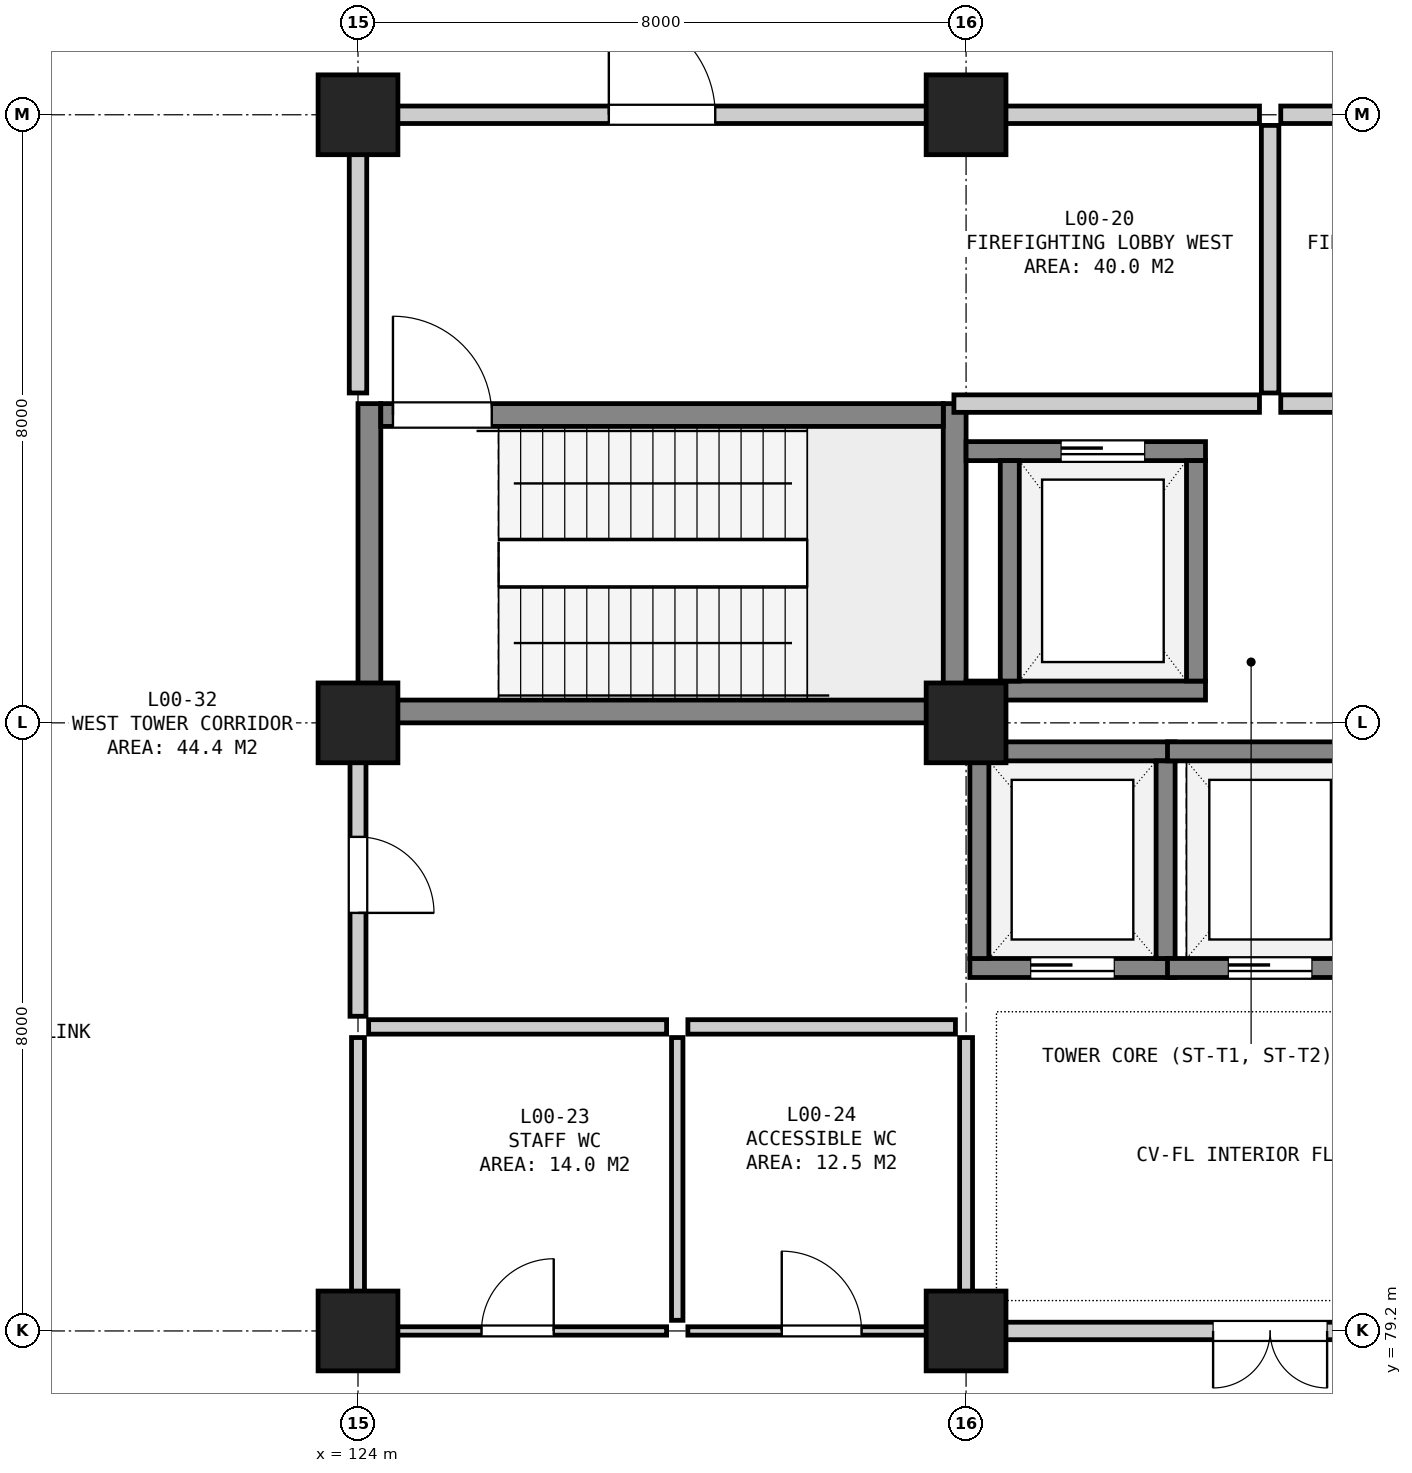
"""IFC4 building model, lengths in metres.
Left out: names, types, materials, properties, quantities, classifications, styles, units other than length and angle.
Written with IfcOpenShell. Run it as: python <this file> out.ifc"""

import sys

from ifc_helpers import new_model, si_unit, direction, frame, frame_2d, origin, origin_2d, place, context, subcontext, project, spatial, rectangle, extrude, element, fill, save


model = new_model("IFC4")
c1 = context("Model", 3, precision=1e-05, world=origin(), true_north=direction((0.0, 1.0)))
c2 = subcontext(c1, "Body", "Model", "MODEL_VIEW")
j1 = project(units=[si_unit("LENGTHUNIT", "METRE"), si_unit("PLANEANGLEUNIT", "RADIAN")], contexts=[c1])
p1 = place(None, origin())
s1 = spatial("IfcSite", under=j1, at=p1, CompositionType="ELEMENT")
p2 = place(p1, origin())
s2 = spatial("IfcBuilding", under=s1, at=p2, CompositionType="ELEMENT")
p3 = place(p2, origin())
s3 = spatial("IfcBuildingStorey", under=s2, at=p3, CompositionType="ELEMENT", Elevation=0.0)
for number, where, z_axis, x_axis in (
    (1, (124.0, 79.2, 0.0), (0.0, 0.0, 1.0), (1.0, 0.0, 0.0)),
    (2, (124.0, 87.2, 0.0), (0.0, 0.0, 1.0), (1.0, 0.0, 0.0)),
    (3, (124.0, 95.2, 0.0), (0.0, 0.0, 1.0), (1.0, 0.0, 0.0)),
    (4, (132.0, 79.2, 0.0), (0.0, 0.0, 1.0), (1.0, 0.0, 0.0)),
    (5, (132.0, 87.2, 0.0), (0.0, 0.0, 1.0), (1.0, 0.0, 0.0)),
    (6, (132.0, 95.2, 0.0), (0.0, 0.0, 1.0), (1.0, 0.0, 0.0)),
):
    element("IfcColumn", number, at=place(p3, frame(where, z_axis=z_axis, x_axis=x_axis)), inside=s3, PredefinedType="COLUMN", context=c2, shape_type="SweptSolid", body=[
        extrude(rectangle(XDim=1.05, YDim=1.05, at=origin_2d()), origin(), (0.0, 0.0, 1.0), 5.4),
    ])
for number, where, z_axis, x_axis in (
    (7, (124.15, 87.2, 0.0), (0.0, 0.0, 1.0), (0.0, 1.0, 0.0)),
    (8, (131.85, 87.2, 0.0), (0.0, 0.0, 1.0), (0.0, 1.0, 0.0)),
):
    element("IfcWall", number, at=place(p3, frame(where, z_axis=z_axis, x_axis=x_axis)), inside=s3, PredefinedType="SHEAR", context=c2, shape_type="SweptSolid", body=[
        extrude(rectangle(XDim=4.2, YDim=0.3, at=frame_2d((2.1, 0.0))), origin(), (0.0, 0.0, 1.0), 5.08),
    ])
p4 = place(p3, frame((124.3, 87.35, 0.0), z_axis=(0.0, 0.0, 1.0), x_axis=(1.0, 0.0, 0.0)))
e9 = element("IfcWall", 9, at=p4, inside=s3, PredefinedType="SHEAR", context=c2, shape_type="SweptSolid", body=[
    extrude(rectangle(XDim=7.4, YDim=0.3, at=frame_2d((3.7, 0.0))), origin(), (0.0, 0.0, 1.0), 5.08),
])
p5 = place(p3, frame((124.3, 91.25, 0.0), z_axis=(0.0, 0.0, 1.0), x_axis=(1.0, 0.0, 0.0)))
e10 = element("IfcWall", 10, at=p5, inside=s3, PredefinedType="SHEAR", context=c2, shape_type="SweptSolid", body=[
    extrude(rectangle(XDim=7.4, YDim=0.3, at=frame_2d((3.7, 0.0))), origin(), (0.0, 0.0, 1.0), 5.08),
])
p6 = place(p5, frame((0.16, 0.0, 0.0)))
e11 = element("IfcOpeningElement", 11, at=p6, cuts=e10, PredefinedType="OPENING", context=c2, shape_type="SweptSolid", body=[
    extrude(rectangle(XDim=1.3, YDim=2.18, at=frame_2d((0.65, 1.09))), frame((0.0, 0.162, 0.0), z_axis=(0.0, -1.0, 0.0), x_axis=(1.0, 0.0, 0.0)), (0.0, 0.0, 1.0), 0.324),
])
p7 = place(p3, frame((132.0, 87.625, 0.0), z_axis=(0.0, 0.0, 1.0), x_axis=(1.0, 0.0, 0.0)))
e12 = element("IfcWall", 12, at=p7, inside=s3, PredefinedType="SHEAR", context=c2, shape_type="SweptSolid", body=[
    extrude(rectangle(XDim=3.15, YDim=0.25, at=frame_2d((1.575, 0.0))), origin(), (0.0, 0.0, 1.0), 5.08),
])
p8 = place(p3, frame((132.0, 90.775, 0.0), z_axis=(0.0, 0.0, 1.0), x_axis=(1.0, 0.0, 0.0)))
e13 = element("IfcWall", 13, at=p8, inside=s3, PredefinedType="SHEAR", context=c2, shape_type="SweptSolid", body=[
    extrude(rectangle(XDim=3.15, YDim=0.25, at=frame_2d((1.575, 0.0))), origin(), (0.0, 0.0, 1.0), 5.08),
])
p9 = place(p8, frame((1.25, 0.0, 0.0)))
e14 = element("IfcOpeningElement", 14, at=p9, cuts=e13, PredefinedType="OPENING", context=c2, shape_type="SweptSolid", body=[
    extrude(rectangle(XDim=1.1, YDim=2.15, at=frame_2d((0.55, 1.075))), frame((0.0, 0.137, 0.0), z_axis=(0.0, -1.0, 0.0), x_axis=(1.0, 0.0, 0.0)), (0.0, 0.0, 1.0), 0.274),
])
for number, where, z_axis, x_axis in (
    (15, (132.575, 87.75, 0.0), (0.0, 0.0, 1.0), (0.0, 1.0, 0.0)),
    (16, (135.025, 87.75, 0.0), (0.0, 0.0, 1.0), (0.0, 1.0, 0.0)),
):
    element("IfcWall", number, at=place(p3, frame(where, z_axis=z_axis, x_axis=x_axis)), inside=s3, PredefinedType="SHEAR", context=c2, shape_type="SweptSolid", body=[
        extrude(rectangle(XDim=2.9, YDim=0.25, at=frame_2d((1.45, 0.0))), origin(), (0.0, 0.0, 1.0), 5.08),
    ])
p10 = place(p3, frame((132.05, 83.975, 0.0), z_axis=(0.0, 0.0, 1.0), x_axis=(1.0, 0.0, 0.0)))
e17 = element("IfcWall", 17, at=p10, inside=s3, PredefinedType="SHEAR", context=c2, shape_type="SweptSolid", body=[
    extrude(rectangle(XDim=2.7, YDim=0.25, at=frame_2d((1.35, 0.0))), origin(), (0.0, 0.0, 1.0), 5.08),
])
p11 = place(p10, frame((0.8, 0.0, 0.0)))
e18 = element("IfcOpeningElement", 18, at=p11, cuts=e17, PredefinedType="OPENING", context=c2, shape_type="SweptSolid", body=[
    extrude(rectangle(XDim=1.1, YDim=2.15, at=frame_2d((0.55, 1.075))), frame((0.0, 0.137, 0.0), z_axis=(0.0, -1.0, 0.0), x_axis=(1.0, 0.0, 0.0)), (0.0, 0.0, 1.0), 0.274),
])
p12 = place(p3, frame((132.05, 86.825, 0.0), z_axis=(0.0, 0.0, 1.0), x_axis=(1.0, 0.0, 0.0)))
e19 = element("IfcWall", 19, at=p12, inside=s3, PredefinedType="SHEAR", context=c2, shape_type="SweptSolid", body=[
    extrude(rectangle(XDim=2.7, YDim=0.25, at=frame_2d((1.35, 0.0))), origin(), (0.0, 0.0, 1.0), 5.08),
])
for number, where, z_axis, x_axis in (
    (20, (132.175, 84.1, 0.0), (0.0, 0.0, 1.0), (0.0, 1.0, 0.0)),
    (21, (134.625, 84.1, 0.0), (0.0, 0.0, 1.0), (0.0, 1.0, 0.0)),
):
    element("IfcWall", number, at=place(p3, frame(where, z_axis=z_axis, x_axis=x_axis)), inside=s3, PredefinedType="SHEAR", context=c2, shape_type="SweptSolid", body=[
        extrude(rectangle(XDim=2.6, YDim=0.25, at=frame_2d((1.3, 0.0))), origin(), (0.0, 0.0, 1.0), 5.08),
    ])
p13 = place(p3, frame((134.65, 83.975, 0.0), z_axis=(0.0, 0.0, 1.0), x_axis=(1.0, 0.0, 0.0)))
e22 = element("IfcWall", 22, at=p13, inside=s3, PredefinedType="SHEAR", context=c2, shape_type="SweptSolid", body=[
    extrude(rectangle(XDim=2.7, YDim=0.25, at=frame_2d((1.35, 0.0))), origin(), (0.0, 0.0, 1.0), 5.08),
])
p14 = place(p13, frame((0.8, 0.0, 0.0)))
e23 = element("IfcOpeningElement", 23, at=p14, cuts=e22, PredefinedType="OPENING", context=c2, shape_type="SweptSolid", body=[
    extrude(rectangle(XDim=1.1, YDim=2.15, at=frame_2d((0.55, 1.075))), frame((0.0, 0.137, 0.0), z_axis=(0.0, -1.0, 0.0), x_axis=(1.0, 0.0, 0.0)), (0.0, 0.0, 1.0), 0.274),
])
p15 = place(p3, frame((134.65, 86.825, 0.0), z_axis=(0.0, 0.0, 1.0), x_axis=(1.0, 0.0, 0.0)))
e24 = element("IfcWall", 24, at=p15, inside=s3, PredefinedType="SHEAR", context=c2, shape_type="SweptSolid", body=[
    extrude(rectangle(XDim=2.7, YDim=0.25, at=frame_2d((1.35, 0.0))), origin(), (0.0, 0.0, 1.0), 5.08),
])
p16 = place(p3, frame((131.84, 91.4, 0.0), z_axis=(0.0, 0.0, 1.0), x_axis=(1.0, 0.0, 0.0)))
e25 = element("IfcWall", 25, at=p16, inside=s3, PredefinedType="SOLIDWALL", context=c2, shape_type="SweptSolid", body=[
    extrude(rectangle(XDim=4.02, YDim=0.23, at=frame_2d((2.01, 0.0))), origin(), (0.0, 0.0, 1.0), 5.08),
])
p17 = place(p3, frame((124.14, 95.2, 0.0), z_axis=(0.0, 0.0, 1.0), x_axis=(1.0, 0.0, 0.0)))
e26 = element("IfcWall", 26, at=p17, inside=s3, PredefinedType="SOLIDWALL", context=c2, shape_type="SweptSolid", body=[
    extrude(rectangle(XDim=11.72, YDim=0.23, at=frame_2d((5.86, 0.0))), origin(), (0.0, 0.0, 1.0), 4.475),
])
p18 = place(p17, frame((3.16, 0.0, 0.0)))
e27 = element("IfcOpeningElement", 27, at=p18, cuts=e26, PredefinedType="OPENING", context=c2, shape_type="SweptSolid", body=[
    extrude(rectangle(XDim=1.4, YDim=2.2, at=frame_2d((0.7, 1.1))), frame((0.0, 0.127, 0.0), z_axis=(0.0, -1.0, 0.0), x_axis=(1.0, 0.0, 0.0)), (0.0, 0.0, 1.0), 0.254),
])
p19 = place(p3, frame((124.0, 91.54, 0.0), z_axis=(0.0, 0.0, 1.0), x_axis=(0.0, 1.0, 0.0)))
e28 = element("IfcWall", 28, at=p19, inside=s3, PredefinedType="SOLIDWALL", context=c2, shape_type="SweptSolid", body=[
    extrude(rectangle(XDim=3.52, YDim=0.23, at=frame_2d((1.76, 0.0))), origin(), (0.0, 0.0, 1.0), 4.525),
])
p20 = place(p3, frame((136.0, 91.54, 0.0), z_axis=(0.0, 0.0, 1.0), x_axis=(0.0, 1.0, 0.0)))
e29 = element("IfcWall", 29, at=p20, inside=s3, PredefinedType="SOLIDWALL", context=c2, shape_type="SweptSolid", body=[
    extrude(rectangle(XDim=3.52, YDim=0.23, at=frame_2d((1.76, 0.0))), origin(), (0.0, 0.0, 1.0), 5.08),
])
p21 = place(p3, frame((136.14, 91.4, 0.0), z_axis=(0.0, 0.0, 1.0), x_axis=(1.0, 0.0, 0.0)))
e30 = element("IfcWall", 30, at=p21, inside=s3, PredefinedType="SOLIDWALL", context=c2, shape_type="SweptSolid", body=[
    extrude(rectangle(XDim=4.02, YDim=0.23, at=frame_2d((2.01, 0.0))), origin(), (0.0, 0.0, 1.0), 5.08),
])
p22 = place(p3, frame((136.14, 95.2, 0.0), z_axis=(0.0, 0.0, 1.0), x_axis=(1.0, 0.0, 0.0)))
e31 = element("IfcWall", 31, at=p22, inside=s3, PredefinedType="SOLIDWALL", context=c2, shape_type="SweptSolid", body=[
    extrude(rectangle(XDim=11.72, YDim=0.23, at=frame_2d((5.86, 0.0))), origin(), (0.0, 0.0, 1.0), 4.525),
])
p23 = place(p22, frame((7.16, 0.0, 0.0)))
e32 = element("IfcOpeningElement", 32, at=p23, cuts=e31, PredefinedType="OPENING", context=c2, shape_type="SweptSolid", body=[
    extrude(rectangle(XDim=1.4, YDim=2.2, at=frame_2d((0.7, 1.1))), frame((0.0, 0.127, 0.0), z_axis=(0.0, -1.0, 0.0), x_axis=(1.0, 0.0, 0.0)), (0.0, 0.0, 1.0), 0.254),
])
p24 = place(p3, frame((124.14, 79.2, 0.0), z_axis=(0.0, 0.0, 1.0), x_axis=(1.0, 0.0, 0.0)))
e33 = element("IfcWall", 33, at=p24, inside=s3, PredefinedType="PARTITIONING", context=c2, shape_type="SweptSolid", body=[
    extrude(rectangle(XDim=3.92, YDim=0.11, at=frame_2d((1.96, 0.0))), origin(), (0.0, 0.0, 1.0), 4.425),
])
p25 = place(p24, frame((1.485, 0.0, 0.0)))
e34 = element("IfcOpeningElement", 34, at=p25, cuts=e33, PredefinedType="OPENING", context=c2, shape_type="SweptSolid", body=[
    extrude(rectangle(XDim=0.95, YDim=2.15, at=frame_2d((0.475, 1.075))), frame((0.0, 0.067, 0.0), z_axis=(0.0, -1.0, 0.0), x_axis=(1.0, 0.0, 0.0)), (0.0, 0.0, 1.0), 0.134),
])
p26 = place(p3, frame((124.14, 83.2, 0.0), z_axis=(0.0, 0.0, 1.0), x_axis=(1.0, 0.0, 0.0)))
e35 = element("IfcWall", 35, at=p26, inside=s3, PredefinedType="PARTITIONING", context=c2, shape_type="SweptSolid", body=[
    extrude(rectangle(XDim=3.92, YDim=0.19, at=frame_2d((1.96, 0.0))), origin(), (0.0, 0.0, 1.0), 5.08),
])
p27 = place(p3, frame((124.0, 79.34, 0.0), z_axis=(0.0, 0.0, 1.0), x_axis=(0.0, 1.0, 0.0)))
e36 = element("IfcWall", 36, at=p27, inside=s3, PredefinedType="PARTITIONING", context=c2, shape_type="SweptSolid", body=[
    extrude(rectangle(XDim=3.72, YDim=0.17, at=frame_2d((1.86, 0.0))), origin(), (0.0, 0.0, 1.0), 4.475),
])
p28 = place(p3, frame((128.2, 79.34, 0.0), z_axis=(0.0, 0.0, 1.0), x_axis=(0.0, 1.0, 0.0)))
e37 = element("IfcWall", 37, at=p28, inside=s3, PredefinedType="PARTITIONING", context=c2, shape_type="SweptSolid", body=[
    extrude(rectangle(XDim=3.72, YDim=0.15, at=frame_2d((1.86, 0.0))), origin(), (0.0, 0.0, 1.0), 5.08),
])
p29 = place(p3, frame((128.34, 79.2, 0.0), z_axis=(0.0, 0.0, 1.0), x_axis=(1.0, 0.0, 0.0)))
e38 = element("IfcWall", 38, at=p29, inside=s3, PredefinedType="PARTITIONING", context=c2, shape_type="SweptSolid", body=[
    extrude(rectangle(XDim=3.52, YDim=0.11, at=frame_2d((1.76, 0.0))), origin(), (0.0, 0.0, 1.0), 4.425),
])
p30 = place(p29, frame((1.235, 0.0, 0.0)))
e39 = element("IfcOpeningElement", 39, at=p30, cuts=e38, PredefinedType="OPENING", context=c2, shape_type="SweptSolid", body=[
    extrude(rectangle(XDim=1.05, YDim=2.15, at=frame_2d((0.525, 1.075))), frame((0.0, 0.067, 0.0), z_axis=(0.0, -1.0, 0.0), x_axis=(1.0, 0.0, 0.0)), (0.0, 0.0, 1.0), 0.134),
])
p31 = place(p3, frame((128.34, 83.2, 0.0), z_axis=(0.0, 0.0, 1.0), x_axis=(1.0, 0.0, 0.0)))
e40 = element("IfcWall", 40, at=p31, inside=s3, PredefinedType="PARTITIONING", context=c2, shape_type="SweptSolid", body=[
    extrude(rectangle(XDim=3.52, YDim=0.19, at=frame_2d((1.76, 0.0))), origin(), (0.0, 0.0, 1.0), 5.08),
])
p32 = place(p3, frame((132.0, 79.34, 0.0), z_axis=(0.0, 0.0, 1.0), x_axis=(0.0, 1.0, 0.0)))
e41 = element("IfcWall", 41, at=p32, inside=s3, PredefinedType="PARTITIONING", context=c2, shape_type="SweptSolid", body=[
    extrude(rectangle(XDim=3.72, YDim=0.17, at=frame_2d((1.86, 0.0))), origin(), (0.0, 0.0, 1.0), 4.425),
])
p33 = place(p3, frame((124.0, 83.34, 0.0), z_axis=(0.0, 0.0, 1.0), x_axis=(0.0, 1.0, 0.0)))
e42 = element("IfcWall", 42, at=p33, inside=s3, PredefinedType="SOLIDWALL", context=c2, shape_type="SweptSolid", body=[
    extrude(rectangle(XDim=3.72, YDim=0.21, at=frame_2d((1.86, 0.0))), origin(), (0.0, 0.0, 1.0), 4.475),
])
p34 = place(p33, frame((1.36, 0.0, 0.0)))
e43 = element("IfcOpeningElement", 43, at=p34, cuts=e42, PredefinedType="OPENING", context=c2, shape_type="SweptSolid", body=[
    extrude(rectangle(XDim=1.0, YDim=2.15, at=frame_2d((0.5, 1.075))), frame((0.0, 0.117, 0.0), z_axis=(0.0, -1.0, 0.0), x_axis=(1.0, 0.0, 0.0)), (0.0, 0.0, 1.0), 0.234),
])
p35 = place(p3, frame((132.14, 79.2, 0.0), z_axis=(0.0, 0.0, 1.0), x_axis=(1.0, 0.0, 0.0)))
e44 = element("IfcWall", 44, at=p35, inside=s3, PredefinedType="SOLIDWALL", context=c2, shape_type="SweptSolid", body=[
    extrude(rectangle(XDim=7.72, YDim=0.23, at=frame_2d((3.86, 0.0))), origin(), (0.0, 0.0, 1.0), 4.475),
])
p36 = place(p35, frame((3.11, 0.0, 0.0)))
e45 = element("IfcOpeningElement", 45, at=p36, cuts=e44, PredefinedType="OPENING", context=c2, shape_type="SweptSolid", body=[
    extrude(rectangle(XDim=1.5, YDim=2.2, at=frame_2d((0.75, 1.1))), frame((0.0, 0.127, 0.0), z_axis=(0.0, -1.0, 0.0), x_axis=(1.0, 0.0, 0.0)), (0.0, 0.0, 1.0), 0.254),
])
p37 = place(p6, origin())
e46 = element("IfcDoor", 46, at=p37, inside=s3, OperationType="SINGLE_SWING_LEFT", PredefinedType="DOOR", context=c2, shape_type="SweptSolid", body=[
    extrude(rectangle(XDim=1.3, YDim=2.18, at=frame_2d((0.65, 1.09))), frame((0.0, 0.025, 0.0), z_axis=(0.0, -1.0, 0.0), x_axis=(1.0, 0.0, 0.0)), (0.0, 0.0, 1.0), 0.05),
])
fill(e11, e46)
p38 = place(p9, origin())
e47 = element("IfcDoor", 47, at=p38, inside=s3, OperationType="SLIDING_TO_LEFT", PredefinedType="DOOR", context=c2, shape_type="SweptSolid", body=[
    extrude(rectangle(XDim=1.1, YDim=2.15, at=frame_2d((0.55, 1.075))), frame((0.0, 0.025, 0.0), z_axis=(0.0, -1.0, 0.0), x_axis=(1.0, 0.0, 0.0)), (0.0, 0.0, 1.0), 0.05),
])
fill(e14, e47)
p39 = place(p11, origin())
e48 = element("IfcDoor", 48, at=p39, inside=s3, OperationType="SLIDING_TO_LEFT", PredefinedType="DOOR", context=c2, shape_type="SweptSolid", body=[
    extrude(rectangle(XDim=1.1, YDim=2.15, at=frame_2d((0.55, 1.075))), frame((0.0, 0.025, 0.0), z_axis=(0.0, -1.0, 0.0), x_axis=(1.0, 0.0, 0.0)), (0.0, 0.0, 1.0), 0.05),
])
fill(e18, e48)
p40 = place(p14, origin())
e49 = element("IfcDoor", 49, at=p40, inside=s3, OperationType="SLIDING_TO_LEFT", PredefinedType="DOOR", context=c2, shape_type="SweptSolid", body=[
    extrude(rectangle(XDim=1.1, YDim=2.15, at=frame_2d((0.55, 1.075))), frame((0.0, 0.025, 0.0), z_axis=(0.0, -1.0, 0.0), x_axis=(1.0, 0.0, 0.0)), (0.0, 0.0, 1.0), 0.05),
])
fill(e23, e49)
p41 = place(p18, origin())
e50 = element("IfcDoor", 50, at=p41, inside=s3, OperationType="SINGLE_SWING_LEFT", PredefinedType="DOOR", context=c2, shape_type="SweptSolid", body=[
    extrude(rectangle(XDim=1.4, YDim=2.2, at=frame_2d((0.7, 1.1))), frame((0.0, 0.025, 0.0), z_axis=(0.0, -1.0, 0.0), x_axis=(1.0, 0.0, 0.0)), (0.0, 0.0, 1.0), 0.05),
])
fill(e27, e50)
p42 = place(p25, origin())
e51 = element("IfcDoor", 51, at=p42, inside=s3, OperationType="SINGLE_SWING_RIGHT", PredefinedType="DOOR", context=c2, shape_type="SweptSolid", body=[
    extrude(rectangle(XDim=0.95, YDim=2.15, at=frame_2d((0.475, 1.075))), frame((0.0, 0.025, 0.0), z_axis=(0.0, -1.0, 0.0), x_axis=(1.0, 0.0, 0.0)), (0.0, 0.0, 1.0), 0.05),
])
fill(e34, e51)
p43 = place(p30, origin())
e52 = element("IfcDoor", 52, at=p43, inside=s3, OperationType="SINGLE_SWING_LEFT", PredefinedType="DOOR", context=c2, shape_type="SweptSolid", body=[
    extrude(rectangle(XDim=1.05, YDim=2.15, at=frame_2d((0.525, 1.075))), frame((0.0, 0.025, 0.0), z_axis=(0.0, -1.0, 0.0), x_axis=(1.0, 0.0, 0.0)), (0.0, 0.0, 1.0), 0.05),
])
fill(e39, e52)
p44 = place(p34, frame((1.0, 0.0, 0.0), z_axis=(0.0, 0.0, 1.0), x_axis=(-1.0, 0.0, 0.0)))
e53 = element("IfcDoor", 53, at=p44, inside=s3, OperationType="SINGLE_SWING_RIGHT", PredefinedType="DOOR", context=c2, shape_type="SweptSolid", body=[
    extrude(rectangle(XDim=1.0, YDim=2.15, at=frame_2d((0.5, 1.075))), frame((0.0, 0.025, 0.0), z_axis=(0.0, -1.0, 0.0), x_axis=(1.0, 0.0, 0.0)), (0.0, 0.0, 1.0), 0.05),
])
fill(e43, e53)
p45 = place(p36, frame((1.5, 0.0, 0.0), z_axis=(0.0, 0.0, 1.0), x_axis=(-1.0, 0.0, 0.0)))
e54 = element("IfcDoor", 54, at=p45, inside=s3, OperationType="DOUBLE_DOOR_SINGLE_SWING", PredefinedType="DOOR", context=c2, shape_type="SweptSolid", body=[
    extrude(rectangle(XDim=1.5, YDim=2.2, at=frame_2d((0.75, 1.1))), frame((0.0, 0.025, 0.0), z_axis=(0.0, -1.0, 0.0), x_axis=(1.0, 0.0, 0.0)), (0.0, 0.0, 1.0), 0.05),
])
fill(e45, e54)
save(model, sys.argv[1])
